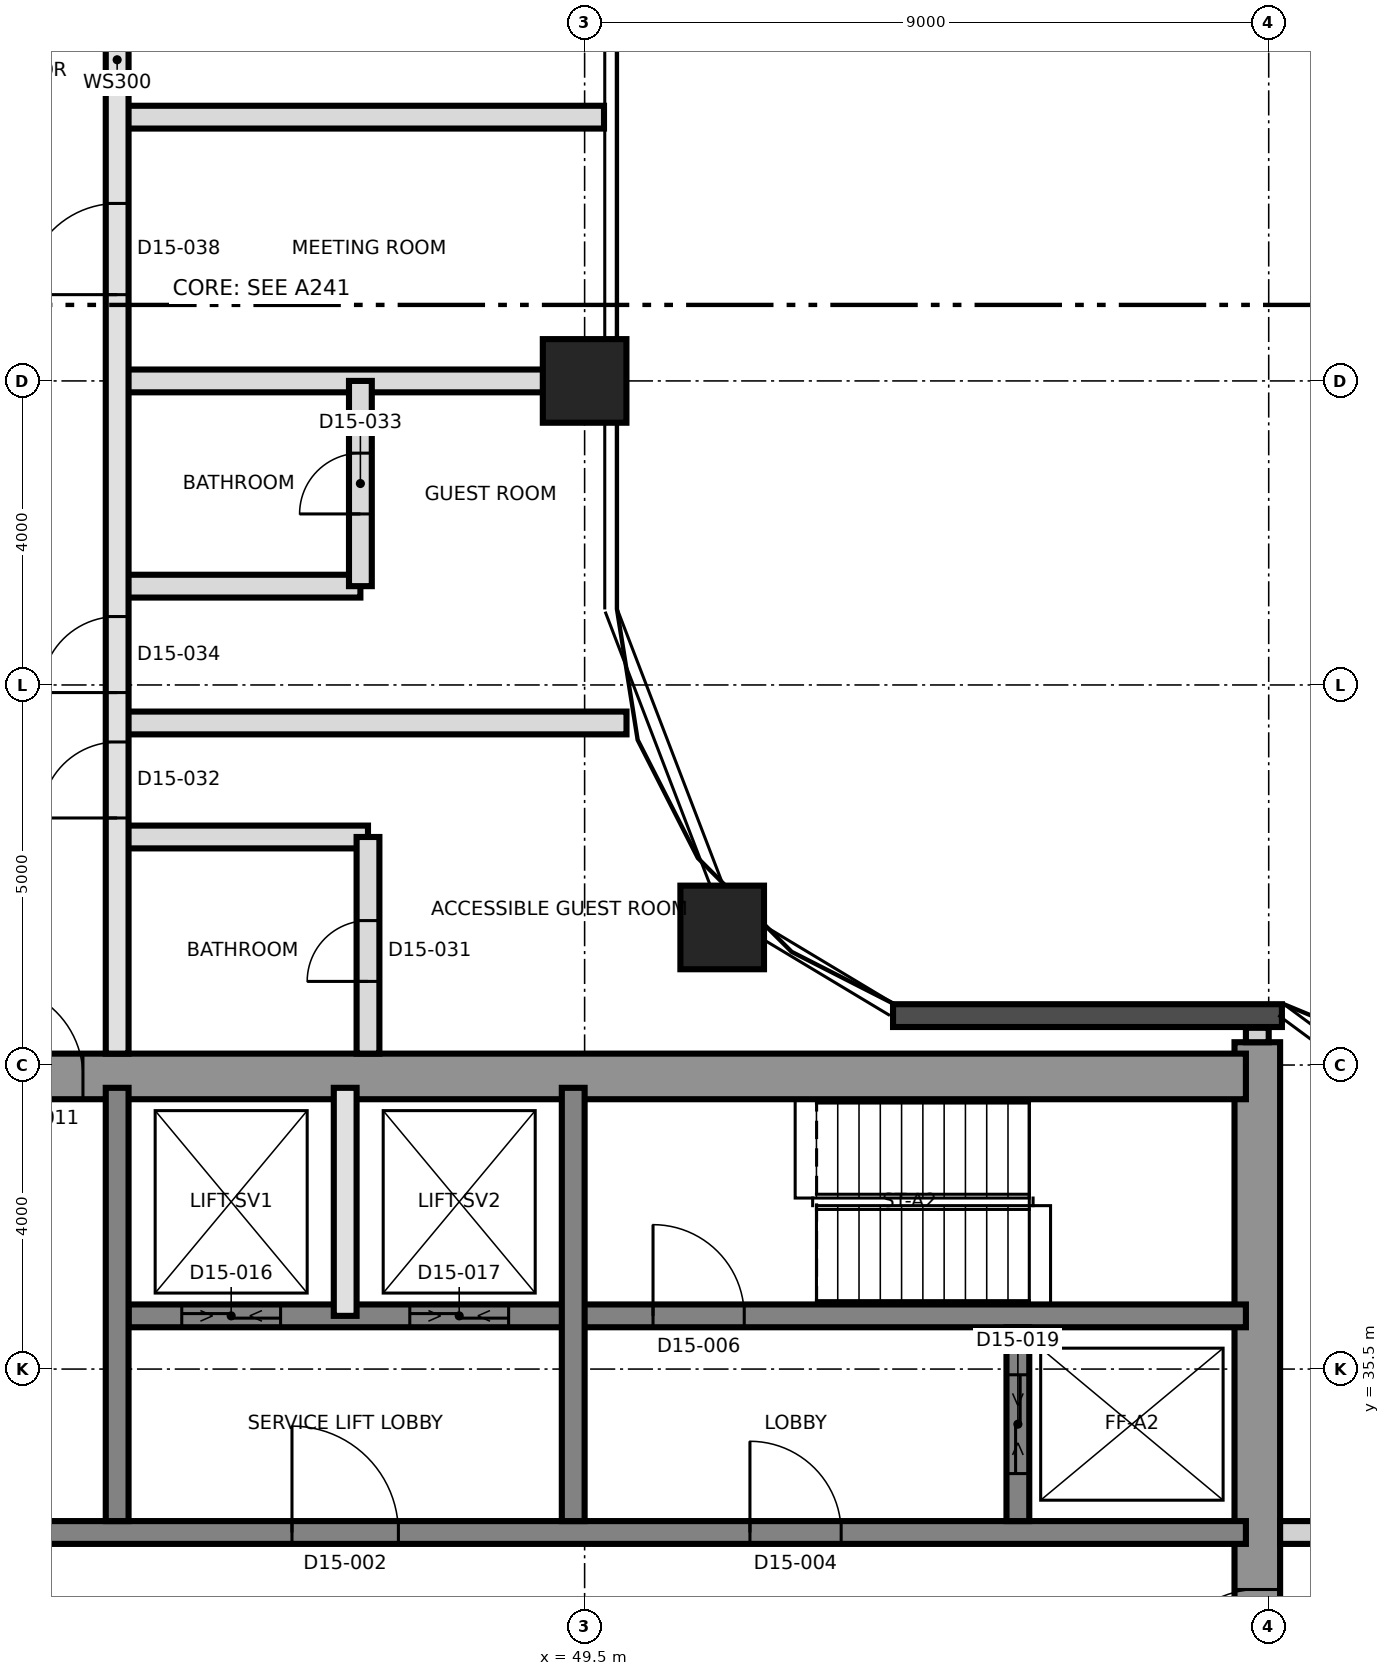
"""IFC4 building model, lengths in metres.
Left out: names, types, materials, properties, quantities, classifications, styles, units other than length and angle.
Written with IfcOpenShell. Run it as: python <this file> out.ifc"""

import sys

from ifc_helpers import new_model, si_unit, direction, frame, frame_2d, origin, origin_2d, place, context, subcontext, project, spatial, rectangle, extrude, element, fill, save


model = new_model("IFC4")
c1 = context("Model", 3, precision=1e-05, world=origin(), true_north=direction((0.0, 1.0)))
c2 = subcontext(c1, "Body", "Model", "MODEL_VIEW")
j1 = project(units=[si_unit("LENGTHUNIT", "METRE"), si_unit("PLANEANGLEUNIT", "RADIAN")], contexts=[c1])
p1 = place(None, origin())
s1 = spatial("IfcSite", under=j1, at=p1, CompositionType="ELEMENT")
p2 = place(p1, origin())
s2 = spatial("IfcBuilding", under=s1, at=p2, CompositionType="ELEMENT")
p3 = place(p2, frame((0.0, 0.0, 157.0)))
s3 = spatial("IfcBuildingStorey", under=s2, at=p3, CompositionType="ELEMENT", Elevation=157.0)
p4 = place(p3, frame((58.35, 21.2, 0.0), z_axis=(0.0, 0.0, 1.0), x_axis=(0.0, 1.0, 0.0)))
e1 = element("IfcWall", 1, at=p4, inside=s3, PredefinedType="SHEAR", context=c2, shape_type="SweptSolid", body=[
    extrude(rectangle(XDim=18.6, YDim=0.6, at=frame_2d((9.3, 0.0))), origin(), (0.0, 0.0, 1.0), 3.7),
])
p5 = place(p4, frame((10.2, 0.0, 0.0)))
e2 = element("IfcOpeningElement", 2, at=p5, cuts=e1, PredefinedType="OPENING", context=c2, shape_type="SweptSolid", body=[
    extrude(rectangle(XDim=1.2, YDim=2.1, at=frame_2d((0.6, 1.05))), frame((0.0, 0.31, 0.0), z_axis=(0.0, -1.0, 0.0), x_axis=(1.0, 0.0, 0.0)), (0.0, 0.0, 1.0), 0.62),
])
p6 = place(p3, frame((31.2, 39.35, 0.0), z_axis=(0.0, 0.0, 1.0), x_axis=(1.0, 0.0, 0.0)))
e3 = element("IfcWall", 3, at=p6, inside=s3, PredefinedType="SHEAR", context=c2, shape_type="SweptSolid", body=[
    extrude(rectangle(XDim=27.0, YDim=0.6, at=frame_2d((13.5, 0.0))), origin(), (0.0, 0.0, 1.0), 3.7),
])
p7 = place(p6, frame((10.5, 0.0, 0.0)))
e4 = element("IfcOpeningElement", 4, at=p7, cuts=e3, PredefinedType="OPENING", context=c2, shape_type="SweptSolid", body=[
    extrude(rectangle(XDim=1.2, YDim=2.1, at=frame_2d((0.6, 1.05))), frame((0.0, 0.31, 0.0), z_axis=(0.0, -1.0, 0.0), x_axis=(1.0, 0.0, 0.0)), (0.0, 0.0, 1.0), 0.62),
])
p8 = place(p3, frame((31.8, 33.35, 0.0), z_axis=(0.0, 0.0, 1.0), x_axis=(1.0, 0.0, 0.0)))
e5 = element("IfcWall", 5, at=p8, inside=s3, PredefinedType="SHEAR", context=c2, shape_type="SweptSolid", body=[
    extrude(rectangle(XDim=26.4, YDim=0.3, at=frame_2d((13.2, 0.0))), origin(), (0.0, 0.0, 1.0), 3.7),
])
p9 = place(p8, frame((13.85, 0.0, 0.0)))
e6 = element("IfcOpeningElement", 6, at=p9, cuts=e5, PredefinedType="OPENING", context=c2, shape_type="SweptSolid", body=[
    extrude(rectangle(XDim=1.4, YDim=2.1, at=frame_2d((0.7, 1.05))), frame((0.0, 0.16, 0.0), z_axis=(0.0, -1.0, 0.0), x_axis=(1.0, 0.0, 0.0)), (0.0, 0.0, 1.0), 0.32),
])
p10 = place(p8, frame((5.325, 0.0, 0.0)))
e7 = element("IfcOpeningElement", 7, at=p10, cuts=e5, PredefinedType="OPENING", context=c2, shape_type="SweptSolid", body=[
    extrude(rectangle(XDim=1.2, YDim=2.1, at=frame_2d((0.6, 1.05))), frame((0.0, 0.16, 0.0), z_axis=(0.0, -1.0, 0.0), x_axis=(1.0, 0.0, 0.0)), (0.0, 0.0, 1.0), 0.32),
])
p11 = place(p8, frame((19.875, 0.0, 0.0)))
e8 = element("IfcOpeningElement", 8, at=p11, cuts=e5, PredefinedType="OPENING", context=c2, shape_type="SweptSolid", body=[
    extrude(rectangle(XDim=1.2, YDim=2.1, at=frame_2d((0.6, 1.05))), frame((0.0, 0.16, 0.0), z_axis=(0.0, -1.0, 0.0), x_axis=(1.0, 0.0, 0.0)), (0.0, 0.0, 1.0), 0.32),
])
p12 = place(p3, frame((43.5, 36.2, 0.0), z_axis=(0.0, 0.0, 1.0), x_axis=(1.0, 0.0, 0.0)))
e9 = element("IfcWall", 9, at=p12, inside=s3, PredefinedType="SHEAR", context=c2, shape_type="SweptSolid", body=[
    extrude(rectangle(XDim=14.7, YDim=0.3, at=frame_2d((7.35, 0.0))), origin(), (0.0, 0.0, 1.0), 3.7),
])
p13 = place(p12, frame((6.9, 0.0, 0.0)))
e10 = element("IfcOpeningElement", 10, at=p13, cuts=e9, PredefinedType="OPENING", context=c2, shape_type="SweptSolid", body=[
    extrude(rectangle(XDim=1.2, YDim=2.1, at=frame_2d((0.6, 1.05))), frame((0.0, 0.16, 0.0), z_axis=(0.0, -1.0, 0.0), x_axis=(1.0, 0.0, 0.0)), (0.0, 0.0, 1.0), 0.32),
])
p14 = place(p12, frame((0.7, 0.0, 0.0)))
e11 = element("IfcOpeningElement", 11, at=p14, cuts=e9, PredefinedType="OPENING", context=c2, shape_type="SweptSolid", body=[
    extrude(rectangle(XDim=1.3, YDim=2.4, at=frame_2d((0.65, 1.2))), frame((0.0, 0.16, 0.0), z_axis=(0.0, -1.0, 0.0), x_axis=(1.0, 0.0, 0.0)), (0.0, 0.0, 1.0), 0.32),
])
p15 = place(p12, frame((3.7, 0.0, 0.0)))
e12 = element("IfcOpeningElement", 12, at=p15, cuts=e9, PredefinedType="OPENING", context=c2, shape_type="SweptSolid", body=[
    extrude(rectangle(XDim=1.3, YDim=2.4, at=frame_2d((0.65, 1.2))), frame((0.0, 0.16, 0.0), z_axis=(0.0, -1.0, 0.0), x_axis=(1.0, 0.0, 0.0)), (0.0, 0.0, 1.0), 0.32),
])
for number, where, z_axis, x_axis in (
    (13, (43.35, 33.5, 0.0), (0.0, 0.0, 1.0), (0.0, 1.0, 0.0)),
    (14, (49.35, 33.5, 0.0), (0.0, 0.0, 1.0), (0.0, 1.0, 0.0)),
):
    element("IfcWall", number, at=place(p3, frame(where, z_axis=z_axis, x_axis=x_axis)), inside=s3, PredefinedType="SHEAR", context=c2, shape_type="SweptSolid", body=[
        extrude(rectangle(XDim=5.7, YDim=0.3, at=frame_2d((2.85, 0.0))), origin(), (0.0, 0.0, 1.0), 3.7),
    ])
p16 = place(p3, frame((55.2, 33.5, 0.0), z_axis=(0.0, 0.0, 1.0), x_axis=(0.0, 1.0, 0.0)))
e15 = element("IfcWall", 15, at=p16, inside=s3, PredefinedType="SHEAR", context=c2, shape_type="SweptSolid", body=[
    extrude(rectangle(XDim=2.55, YDim=0.3, at=frame_2d((1.275, 0.0))), origin(), (0.0, 0.0, 1.0), 3.7),
])
p17 = place(p16, frame((0.625, 0.0, 0.0)))
e16 = element("IfcOpeningElement", 16, at=p17, cuts=e15, PredefinedType="OPENING", context=c2, shape_type="SweptSolid", body=[
    extrude(rectangle(XDim=1.3, YDim=2.4, at=frame_2d((0.65, 1.2))), frame((0.0, 0.16, 0.0), z_axis=(0.0, -1.0, 0.0), x_axis=(1.0, 0.0, 0.0)), (0.0, 0.0, 1.0), 0.32),
])
for number, where, z_axis, x_axis in (
    (17, (51.31, 41.31, 0.0), (0.0, 0.0, 1.0), (1.0, 0.0, 0.0)),
    (18, (49.5, 48.5, 0.0), (0.0, 0.0, 1.0), (1.0, 0.0, 0.0)),
):
    element("IfcColumn", number, at=place(p3, frame(where, z_axis=z_axis, x_axis=x_axis)), inside=s3, PredefinedType="COLUMN", context=c2, shape_type="SweptSolid", body=[
        extrude(rectangle(XDim=1.1, YDim=1.1, at=origin_2d()), origin(), (0.0, 0.0, 1.0), 3.7),
    ])
p18 = place(p3, frame((58.674, 40.15, 0.0), z_axis=(0.0, 0.0, 1.0), x_axis=(-1.0, 0.0, 0.0)))
e19 = element("IfcWall", 19, at=p18, inside=s3, PredefinedType="SOLIDWALL", context=c2, shape_type="SweptSolid", body=[
    extrude(rectangle(XDim=5.116, YDim=0.3, at=frame_2d((2.558, 0.0))), origin(), (0.0, 0.0, 1.0), 3.4),
])
p19 = place(p3, frame((46.35, 36.2, 0.0), z_axis=(0.0, 0.0, 1.0), x_axis=(0.0, 1.0, 0.0)))
e20 = element("IfcWall", 20, at=p19, inside=s3, PredefinedType="SOLIDWALL", context=c2, shape_type="SweptSolid", body=[
    extrude(rectangle(XDim=3.0, YDim=0.3, at=frame_2d((1.5, 0.0))), origin(), (0.0, 0.0, 1.0), 3.4),
])
p20 = place(p3, frame((58.65, 33.35, 0.0), z_axis=(0.0, 0.0, 1.0), x_axis=(1.0, 0.0, 0.0)))
e21 = element("IfcWall", 21, at=p20, inside=s3, PredefinedType="PARTITIONING", context=c2, shape_type="SweptSolid", body=[
    extrude(rectangle(XDim=8.5, YDim=0.3, at=frame_2d((4.25, 0.0))), origin(), (0.0, 0.0, 1.0), 3.4),
])
p21 = place(p20, frame((0.428, 0.0, 0.0)))
e22 = element("IfcOpeningElement", 22, at=p21, cuts=e21, PredefinedType="OPENING", context=c2, shape_type="SweptSolid", body=[
    extrude(rectangle(XDim=1.0, YDim=2.1, at=frame_2d((0.5, 1.05))), frame((0.0, 0.16, 0.0), z_axis=(0.0, -1.0, 0.0), x_axis=(1.0, 0.0, 0.0)), (0.0, 0.0, 1.0), 0.32),
])
p22 = place(p20, frame((6.078, 0.0, 0.0)))
e23 = element("IfcOpeningElement", 23, at=p22, cuts=e21, PredefinedType="OPENING", context=c2, shape_type="SweptSolid", body=[
    extrude(rectangle(XDim=1.0, YDim=2.1, at=frame_2d((0.5, 1.05))), frame((0.0, 0.16, 0.0), z_axis=(0.0, -1.0, 0.0), x_axis=(1.0, 0.0, 0.0)), (0.0, 0.0, 1.0), 0.32),
])
p23 = place(p3, frame((43.35, 42.5, 0.0), z_axis=(0.0, 0.0, 1.0), x_axis=(1.0, 0.0, 0.0)))
e24 = element("IfcWall", 24, at=p23, inside=s3, PredefinedType="PARTITIONING", context=c2, shape_type="SweptSolid", body=[
    extrude(rectangle(XDim=3.3, YDim=0.3, at=frame_2d((1.65, 0.0))), origin(), (0.0, 0.0, 1.0), 3.4),
])
p24 = place(p3, frame((43.35, 44.0, 0.0), z_axis=(0.0, 0.0, 1.0), x_axis=(1.0, 0.0, 0.0)))
e25 = element("IfcWall", 25, at=p24, inside=s3, PredefinedType="PARTITIONING", context=c2, shape_type="SweptSolid", body=[
    extrude(rectangle(XDim=6.701, YDim=0.3, at=frame_2d((3.351, 0.0))), origin(), (0.0, 0.0, 1.0), 3.4),
])
p25 = place(p3, frame((43.35, 45.8, 0.0), z_axis=(0.0, 0.0, 1.0), x_axis=(1.0, 0.0, 0.0)))
e26 = element("IfcWall", 26, at=p25, inside=s3, PredefinedType="PARTITIONING", context=c2, shape_type="SweptSolid", body=[
    extrude(rectangle(XDim=3.2, YDim=0.3, at=frame_2d((1.6, 0.0))), origin(), (0.0, 0.0, 1.0), 3.4),
])
p26 = place(p3, frame((43.35, 48.5, 0.0), z_axis=(0.0, 0.0, 1.0), x_axis=(1.0, 0.0, 0.0)))
e27 = element("IfcWall", 27, at=p26, inside=s3, PredefinedType="PARTITIONING", context=c2, shape_type="SweptSolid", body=[
    extrude(rectangle(XDim=6.225, YDim=0.3, at=frame_2d((3.112, 0.0))), origin(), (0.0, 0.0, 1.0), 3.4),
])
p27 = place(p3, frame((43.35, 51.97, 0.0), z_axis=(0.0, 0.0, 1.0), x_axis=(1.0, 0.0, 0.0)))
e28 = element("IfcWall", 28, at=p27, inside=s3, PredefinedType="PARTITIONING", context=c2, shape_type="SweptSolid", body=[
    extrude(rectangle(XDim=6.405, YDim=0.3, at=frame_2d((3.202, 0.0))), origin(), (0.0, 0.0, 1.0), 3.4),
])
p28 = place(p3, frame((43.35, 39.65, 0.0), z_axis=(0.0, 0.0, 1.0), x_axis=(0.0, 1.0, 0.0)))
e29 = element("IfcWall", 29, at=p28, inside=s3, PredefinedType="SOLIDWALL", context=c2, shape_type="SweptSolid", body=[
    extrude(rectangle(XDim=26.15, YDim=0.3, at=frame_2d((13.075, 0.0))), origin(), (0.0, 0.0, 1.0), 3.4),
])
p29 = place(p28, frame((3.1, 0.0, 0.0)))
e30 = element("IfcOpeningElement", 30, at=p29, cuts=e29, PredefinedType="OPENING", context=c2, shape_type="SweptSolid", body=[
    extrude(rectangle(XDim=1.0, YDim=2.1, at=frame_2d((0.5, 1.05))), frame((0.0, 0.16, 0.0), z_axis=(0.0, -1.0, 0.0), x_axis=(1.0, 0.0, 0.0)), (0.0, 0.0, 1.0), 0.32),
])
p30 = place(p28, frame((4.75, 0.0, 0.0)))
e31 = element("IfcOpeningElement", 31, at=p30, cuts=e29, PredefinedType="OPENING", context=c2, shape_type="SweptSolid", body=[
    extrude(rectangle(XDim=1.0, YDim=2.1, at=frame_2d((0.5, 1.05))), frame((0.0, 0.16, 0.0), z_axis=(0.0, -1.0, 0.0), x_axis=(1.0, 0.0, 0.0)), (0.0, 0.0, 1.0), 0.32),
])
p31 = place(p28, frame((9.985, 0.0, 0.0)))
e32 = element("IfcOpeningElement", 32, at=p31, cuts=e29, PredefinedType="OPENING", context=c2, shape_type="SweptSolid", body=[
    extrude(rectangle(XDim=1.2, YDim=2.1, at=frame_2d((0.6, 1.05))), frame((0.0, 0.16, 0.0), z_axis=(0.0, -1.0, 0.0), x_axis=(1.0, 0.0, 0.0)), (0.0, 0.0, 1.0), 0.32),
])
p32 = place(p28, frame((13.235, 0.0, 0.0)))
e33 = element("IfcOpeningElement", 33, at=p32, cuts=e29, PredefinedType="OPENING", context=c2, shape_type="SweptSolid", body=[
    extrude(rectangle(XDim=1.0, YDim=2.1, at=frame_2d((0.5, 1.05))), frame((0.0, 0.16, 0.0), z_axis=(0.0, -1.0, 0.0), x_axis=(1.0, 0.0, 0.0)), (0.0, 0.0, 1.0), 0.32),
])
p33 = place(p28, frame((21.4, 0.0, 0.0)))
e34 = element("IfcOpeningElement", 34, at=p33, cuts=e29, PredefinedType="OPENING", context=c2, shape_type="SweptSolid", body=[
    extrude(rectangle(XDim=1.0, YDim=2.4, at=frame_2d((0.5, 1.2))), frame((0.0, 0.16, 0.0), z_axis=(0.0, -1.0, 0.0), x_axis=(1.0, 0.0, 0.0)), (0.0, 0.0, 1.0), 0.32),
])
p34 = place(p3, frame((46.55, 45.8, 0.0), z_axis=(0.0, 0.0, 1.0), x_axis=(0.0, 1.0, 0.0)))
e35 = element("IfcWall", 35, at=p34, inside=s3, PredefinedType="PARTITIONING", context=c2, shape_type="SweptSolid", body=[
    extrude(rectangle(XDim=2.7, YDim=0.3, at=frame_2d((1.35, 0.0))), origin(), (0.0, 0.0, 1.0), 3.4),
])
p35 = place(p34, frame((0.95, 0.0, 0.0)))
e36 = element("IfcOpeningElement", 36, at=p35, cuts=e35, PredefinedType="OPENING", context=c2, shape_type="SweptSolid", body=[
    extrude(rectangle(XDim=0.8, YDim=2.1, at=frame_2d((0.4, 1.05))), frame((0.0, 0.16, 0.0), z_axis=(0.0, -1.0, 0.0), x_axis=(1.0, 0.0, 0.0)), (0.0, 0.0, 1.0), 0.32),
])
p36 = place(p3, frame((46.65, 39.65, 0.0), z_axis=(0.0, 0.0, 1.0), x_axis=(0.0, 1.0, 0.0)))
e37 = element("IfcWall", 37, at=p36, inside=s3, PredefinedType="PARTITIONING", context=c2, shape_type="SweptSolid", body=[
    extrude(rectangle(XDim=2.85, YDim=0.3, at=frame_2d((1.425, 0.0))), origin(), (0.0, 0.0, 1.0), 3.4),
])
p37 = place(p36, frame((0.95, 0.0, 0.0)))
e38 = element("IfcOpeningElement", 38, at=p37, cuts=e37, PredefinedType="OPENING", context=c2, shape_type="SweptSolid", body=[
    extrude(rectangle(XDim=0.8, YDim=2.1, at=frame_2d((0.4, 1.05))), frame((0.0, 0.16, 0.0), z_axis=(0.0, -1.0, 0.0), x_axis=(1.0, 0.0, 0.0)), (0.0, 0.0, 1.0), 0.32),
])
p38 = place(p3, frame((58.35, 39.8, 0.0), z_axis=(0.0, 0.0, 1.0), x_axis=(0.0, 1.0, 0.0)))
e39 = element("IfcWall", 39, at=p38, inside=s3, PredefinedType="PARTITIONING", context=c2, shape_type="SweptSolid", body=[
    extrude(rectangle(XDim=0.19, YDim=0.3, at=frame_2d((0.095, 0.0))), origin(), (0.0, 0.0, 1.0), 3.4),
])
p39 = place(p9, origin())
e40 = element("IfcDoor", 40, at=p39, inside=s3, OperationType="SINGLE_SWING_RIGHT", PredefinedType="DOOR", context=c2, shape_type="SweptSolid", body=[
    extrude(rectangle(XDim=1.4, YDim=2.1, at=frame_2d((0.7, 1.05))), frame((0.0, 0.025, 0.0), z_axis=(0.0, -1.0, 0.0), x_axis=(1.0, 0.0, 0.0)), (0.0, 0.0, 1.0), 0.05),
])
fill(e6, e40)
p40 = place(p11, origin())
e41 = element("IfcDoor", 41, at=p40, inside=s3, OperationType="SINGLE_SWING_RIGHT", PredefinedType="DOOR", context=c2, shape_type="SweptSolid", body=[
    extrude(rectangle(XDim=1.2, YDim=2.1, at=frame_2d((0.6, 1.05))), frame((0.0, 0.025, 0.0), z_axis=(0.0, -1.0, 0.0), x_axis=(1.0, 0.0, 0.0)), (0.0, 0.0, 1.0), 0.05),
])
fill(e8, e41)
p41 = place(p13, origin())
e42 = element("IfcDoor", 42, at=p41, inside=s3, OperationType="SINGLE_SWING_LEFT", PredefinedType="DOOR", context=c2, shape_type="SweptSolid", body=[
    extrude(rectangle(XDim=1.2, YDim=2.1, at=frame_2d((0.6, 1.05))), frame((0.0, 0.025, 0.0), z_axis=(0.0, -1.0, 0.0), x_axis=(1.0, 0.0, 0.0)), (0.0, 0.0, 1.0), 0.05),
])
fill(e10, e42)
p42 = place(p5, origin())
e43 = element("IfcDoor", 43, at=p42, inside=s3, OperationType="SINGLE_SWING_LEFT", PredefinedType="DOOR", context=c2, shape_type="SweptSolid", body=[
    extrude(rectangle(XDim=1.2, YDim=2.1, at=frame_2d((0.6, 1.05))), frame((0.0, 0.025, 0.0), z_axis=(0.0, -1.0, 0.0), x_axis=(1.0, 0.0, 0.0)), (0.0, 0.0, 1.0), 0.05),
])
fill(e2, e43)
p43 = place(p7, origin())
e44 = element("IfcDoor", 44, at=p43, inside=s3, OperationType="SINGLE_SWING_RIGHT", PredefinedType="DOOR", context=c2, shape_type="SweptSolid", body=[
    extrude(rectangle(XDim=1.2, YDim=2.1, at=frame_2d((0.6, 1.05))), frame((0.0, 0.025, 0.0), z_axis=(0.0, -1.0, 0.0), x_axis=(1.0, 0.0, 0.0)), (0.0, 0.0, 1.0), 0.05),
])
fill(e4, e44)
p44 = place(p14, origin())
e45 = element("IfcDoor", 45, at=p44, inside=s3, OperationType="SLIDING_TO_LEFT", PredefinedType="DOOR", context=c2, shape_type="SweptSolid", body=[
    extrude(rectangle(XDim=1.3, YDim=2.4, at=frame_2d((0.65, 1.2))), frame((0.0, 0.025, 0.0), z_axis=(0.0, -1.0, 0.0), x_axis=(1.0, 0.0, 0.0)), (0.0, 0.0, 1.0), 0.05),
])
fill(e11, e45)
p45 = place(p15, origin())
e46 = element("IfcDoor", 46, at=p45, inside=s3, OperationType="SLIDING_TO_LEFT", PredefinedType="DOOR", context=c2, shape_type="SweptSolid", body=[
    extrude(rectangle(XDim=1.3, YDim=2.4, at=frame_2d((0.65, 1.2))), frame((0.0, 0.025, 0.0), z_axis=(0.0, -1.0, 0.0), x_axis=(1.0, 0.0, 0.0)), (0.0, 0.0, 1.0), 0.05),
])
fill(e12, e46)
p46 = place(p17, origin())
e47 = element("IfcDoor", 47, at=p46, inside=s3, OperationType="SLIDING_TO_LEFT", PredefinedType="DOOR", context=c2, shape_type="SweptSolid", body=[
    extrude(rectangle(XDim=1.3, YDim=2.4, at=frame_2d((0.65, 1.2))), frame((0.0, 0.025, 0.0), z_axis=(0.0, -1.0, 0.0), x_axis=(1.0, 0.0, 0.0)), (0.0, 0.0, 1.0), 0.05),
])
fill(e16, e47)
p47 = place(p37, origin())
e48 = element("IfcDoor", 48, at=p47, inside=s3, OperationType="SINGLE_SWING_LEFT", PredefinedType="DOOR", context=c2, shape_type="SweptSolid", body=[
    extrude(rectangle(XDim=0.8, YDim=2.1, at=frame_2d((0.4, 1.05))), frame((0.0, 0.025, 0.0), z_axis=(0.0, -1.0, 0.0), x_axis=(1.0, 0.0, 0.0)), (0.0, 0.0, 1.0), 0.05),
])
fill(e38, e48)
p48 = place(p29, origin())
e49 = element("IfcDoor", 49, at=p48, inside=s3, OperationType="SINGLE_SWING_RIGHT", PredefinedType="DOOR", context=c2, shape_type="SweptSolid", body=[
    extrude(rectangle(XDim=1.0, YDim=2.1, at=frame_2d((0.5, 1.05))), frame((0.0, 0.025, 0.0), z_axis=(0.0, -1.0, 0.0), x_axis=(1.0, 0.0, 0.0)), (0.0, 0.0, 1.0), 0.05),
])
fill(e30, e49)
p49 = place(p35, origin())
e50 = element("IfcDoor", 50, at=p49, inside=s3, OperationType="SINGLE_SWING_RIGHT", PredefinedType="DOOR", context=c2, shape_type="SweptSolid", body=[
    extrude(rectangle(XDim=0.8, YDim=2.1, at=frame_2d((0.4, 1.05))), frame((0.0, 0.025, 0.0), z_axis=(0.0, -1.0, 0.0), x_axis=(1.0, 0.0, 0.0)), (0.0, 0.0, 1.0), 0.05),
])
fill(e36, e50)
p50 = place(p30, origin())
e51 = element("IfcDoor", 51, at=p50, inside=s3, OperationType="SINGLE_SWING_LEFT", PredefinedType="DOOR", context=c2, shape_type="SweptSolid", body=[
    extrude(rectangle(XDim=1.0, YDim=2.1, at=frame_2d((0.5, 1.05))), frame((0.0, 0.025, 0.0), z_axis=(0.0, -1.0, 0.0), x_axis=(1.0, 0.0, 0.0)), (0.0, 0.0, 1.0), 0.05),
])
fill(e31, e51)
p51 = place(p31, origin())
e52 = element("IfcDoor", 52, at=p51, inside=s3, OperationType="SINGLE_SWING_LEFT", PredefinedType="DOOR", context=c2, shape_type="SweptSolid", body=[
    extrude(rectangle(XDim=1.2, YDim=2.1, at=frame_2d((0.6, 1.05))), frame((0.0, 0.025, 0.0), z_axis=(0.0, -1.0, 0.0), x_axis=(1.0, 0.0, 0.0)), (0.0, 0.0, 1.0), 0.05),
])
fill(e32, e52)
save(model, sys.argv[1])
